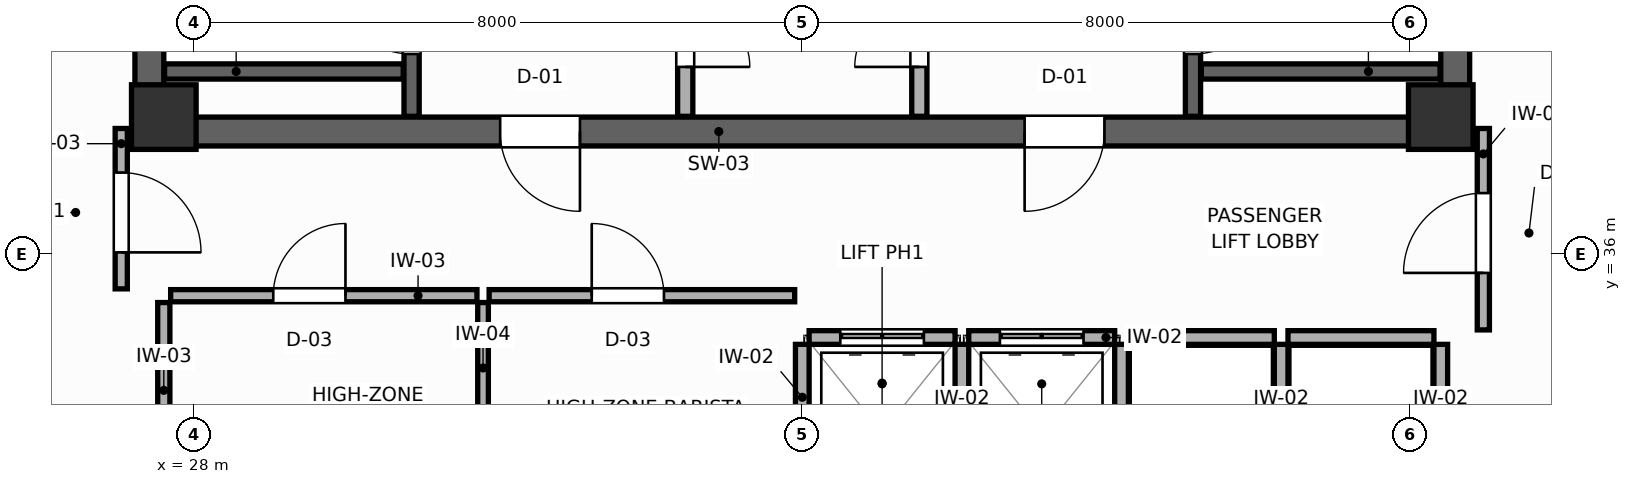
"""IFC4 building model, lengths in metres.
Left out: names, types, materials, properties, quantities, classifications, styles, units other than length and angle.
Written with IfcOpenShell. Run it as: python <this file> out.ifc"""

import sys

from ifc_helpers import new_model, si_unit, direction, frame, frame_2d, origin, origin_2d, place, context, subcontext, project, spatial, rectangle, extrude, source, transform, mapped, element, fill, save


model = new_model("IFC4")
c1 = context("Model", 3, precision=1e-05, world=origin(), true_north=direction((0.0, 1.0)))
c2 = subcontext(c1, "Body", "Model", "MODEL_VIEW")
j1 = project(units=[si_unit("LENGTHUNIT", "METRE"), si_unit("PLANEANGLEUNIT", "RADIAN")], contexts=[c1])
p1 = place(None, origin())
s1 = spatial("IfcSite", under=j1, at=p1, CompositionType="ELEMENT")
p2 = place(p1, origin())
s2 = spatial("IfcBuilding", under=s1, at=p2, CompositionType="ELEMENT")
p3 = place(p2, frame((0.0, 0.0, 264.6)))
s3 = spatial("IfcBuildingStorey", under=s2, at=p3, CompositionType="ELEMENT", Elevation=264.6)
p4 = place(p3, frame((27.22, 37.61, 0.0), z_axis=(0.0, 0.0, 1.0), x_axis=(1.0, 0.0, 0.0)))
e1 = element("IfcWall", 1, at=p4, inside=s3, PredefinedType="SHEAR", context=c2, shape_type="SweptSolid", body=[
    extrude(rectangle(XDim=17.56, YDim=0.38, at=frame_2d((8.78, 0.0))), origin(), (0.0, 0.0, 1.0), 3.6),
])
p5 = place(p4, frame((4.805, 0.0, 0.0)))
e2 = element("IfcOpeningElement", 2, at=p5, cuts=e1, PredefinedType="OPENING", context=c2, shape_type="SweptSolid", body=[
    extrude(rectangle(XDim=1.05, YDim=2.1, at=frame_2d((0.525, 1.05))), frame((0.0, 0.2, 0.0), z_axis=(0.0, -1.0, 0.0), x_axis=(1.0, 0.0, 0.0)), (0.0, 0.0, 1.0), 0.4),
])
p6 = place(p4, frame((11.705, 0.0, 0.0)))
e3 = element("IfcOpeningElement", 3, at=p6, cuts=e1, PredefinedType="OPENING", context=c2, shape_type="SweptSolid", body=[
    extrude(rectangle(XDim=1.05, YDim=2.1, at=frame_2d((0.525, 1.05))), frame((0.0, 0.2, 0.0), z_axis=(0.0, -1.0, 0.0), x_axis=(1.0, 0.0, 0.0)), (0.0, 0.0, 1.0), 0.4),
])
for number, where, z_axis, x_axis in (
    (4, (27.41, 37.8, 0.0), (0.0, 0.0, 1.0), (0.0, 1.0, 0.0)),
    (5, (44.59, 37.8, 0.0), (0.0, 0.0, 1.0), (0.0, 1.0, 0.0)),
):
    element("IfcWall", number, at=place(p3, frame(where, z_axis=z_axis, x_axis=x_axis)), inside=s3, PredefinedType="SHEAR", context=c2, shape_type="SweptSolid", body=[
        extrude(rectangle(XDim=9.0, YDim=0.38, at=frame_2d((4.5, 0.0))), origin(), (0.0, 0.0, 1.0), 3.6),
    ])
m1 = source(origin(), c2, "Body", "SweptSolid", [
    extrude(rectangle(XDim=0.85, YDim=0.85, at=origin_2d()), origin(), (0.0, 0.0, 1.0), 3.6),
])
for number, where, z_axis, x_axis in (
    (6, (27.6, 37.8, 0.0), (0.0, 0.0, 1.0), (1.0, 0.0, 0.0)),
    (7, (44.4, 37.8, 0.0), (0.0, 0.0, 1.0), (1.0, 0.0, 0.0)),
):
    element("IfcColumn", number, at=place(p3, frame(where, z_axis=z_axis, x_axis=x_axis)), inside=s3, PredefinedType="COLUMN", context=c2, shape_type="MappedRepresentation", body=[
        mapped(m1, transform((0.0, 0.0, 0.0), scale=1.0)),
    ])
p7 = place(p3, frame((30.86, 37.81, 0.0), z_axis=(0.0, 0.0, 1.0), x_axis=(0.0, 1.0, 0.0)))
e8 = element("IfcWall", 8, at=p7, inside=s3, PredefinedType="SHEAR", context=c2, shape_type="SweptSolid", body=[
    extrude(rectangle(XDim=8.98, YDim=0.2, at=frame_2d((4.49, 0.0))), origin(), (0.0, 0.0, 1.0), 3.6),
])
p8 = place(p7, frame((0.82, 0.0, 0.0)))
e9 = element("IfcOpeningElement", 9, at=p8, cuts=e8, PredefinedType="OPENING", context=c2, shape_type="SweptSolid", body=[
    extrude(rectangle(XDim=1.05, YDim=2.1, at=frame_2d((0.525, 1.05))), frame((0.0, 0.11, 0.0), z_axis=(0.0, -1.0, 0.0), x_axis=(1.0, 0.0, 0.0)), (0.0, 0.0, 1.0), 0.22),
])
p9 = place(p3, frame((27.61, 38.4, 0.0), z_axis=(0.0, 0.0, 1.0), x_axis=(1.0, 0.0, 0.0)))
e10 = element("IfcWall", 10, at=p9, inside=s3, PredefinedType="SHEAR", context=c2, shape_type="SweptSolid", body=[
    extrude(rectangle(XDim=3.14, YDim=0.2, at=frame_2d((1.57, 0.0))), origin(), (0.0, 0.0, 1.0), 3.6),
])
p10 = place(p3, frame((41.14, 37.81, 0.0), z_axis=(0.0, 0.0, 1.0), x_axis=(0.0, 1.0, 0.0)))
e11 = element("IfcWall", 11, at=p10, inside=s3, PredefinedType="SHEAR", context=c2, shape_type="SweptSolid", body=[
    extrude(rectangle(XDim=8.98, YDim=0.2, at=frame_2d((4.49, 0.0))), origin(), (0.0, 0.0, 1.0), 3.6),
])
p11 = place(p10, frame((0.82, 0.0, 0.0)))
e12 = element("IfcOpeningElement", 12, at=p11, cuts=e11, PredefinedType="OPENING", context=c2, shape_type="SweptSolid", body=[
    extrude(rectangle(XDim=1.05, YDim=2.1, at=frame_2d((0.525, 1.05))), frame((0.0, 0.11, 0.0), z_axis=(0.0, -1.0, 0.0), x_axis=(1.0, 0.0, 0.0)), (0.0, 0.0, 1.0), 0.22),
])
p12 = place(p3, frame((41.25, 38.4, 0.0), z_axis=(0.0, 0.0, 1.0), x_axis=(1.0, 0.0, 0.0)))
e13 = element("IfcWall", 13, at=p12, inside=s3, PredefinedType="SHEAR", context=c2, shape_type="SweptSolid", body=[
    extrude(rectangle(XDim=3.14, YDim=0.2, at=frame_2d((1.57, 0.0))), origin(), (0.0, 0.0, 1.0), 3.6),
])
p13 = place(p3, frame((34.46, 37.81, 0.0), z_axis=(0.0, 0.0, 1.0), x_axis=(0.0, 1.0, 0.0)))
e14 = element("IfcWall", 14, at=p13, inside=s3, PredefinedType="PARTITIONING", context=c2, shape_type="SweptSolid", body=[
    extrude(rectangle(XDim=8.98, YDim=0.2, at=frame_2d((4.49, 0.0))), origin(), (0.0, 0.0, 1.0), 3.41),
])
p14 = place(p13, frame((0.65, 0.0, 0.0)))
e15 = element("IfcOpeningElement", 15, at=p14, cuts=e14, PredefinedType="OPENING", context=c2, shape_type="SweptSolid", body=[
    extrude(rectangle(XDim=0.85, YDim=2.05, at=frame_2d((0.425, 1.025))), frame((0.0, 0.11, 0.0), z_axis=(0.0, -1.0, 0.0), x_axis=(1.0, 0.0, 0.0)), (0.0, 0.0, 1.0), 0.22),
])
p15 = place(p3, frame((37.54, 37.81, 0.0), z_axis=(0.0, 0.0, 1.0), x_axis=(0.0, 1.0, 0.0)))
e16 = element("IfcWall", 16, at=p15, inside=s3, PredefinedType="PARTITIONING", context=c2, shape_type="SweptSolid", body=[
    extrude(rectangle(XDim=8.98, YDim=0.2, at=frame_2d((4.49, 0.0))), origin(), (0.0, 0.0, 1.0), 3.41),
])
p16 = place(p15, frame((0.65, 0.0, 0.0)))
e17 = element("IfcOpeningElement", 17, at=p16, cuts=e16, PredefinedType="OPENING", context=c2, shape_type="SweptSolid", body=[
    extrude(rectangle(XDim=0.85, YDim=2.05, at=frame_2d((0.425, 1.025))), frame((0.0, 0.11, 0.0), z_axis=(0.0, -1.0, 0.0), x_axis=(1.0, 0.0, 0.0)), (0.0, 0.0, 1.0), 0.22),
])
p17 = place(p3, frame((36.09, 34.9, 0.0), z_axis=(0.0, 0.0, 1.0), x_axis=(1.0, 0.0, 0.0)))
e18 = element("IfcWall", 18, at=p17, inside=s3, PredefinedType="PARTITIONING", context=c2, shape_type="SweptSolid", body=[
    extrude(rectangle(XDim=1.92, YDim=0.18, at=frame_2d((0.96, 0.0))), origin(), (0.0, 0.0, 1.0), 3.41),
])
p18 = place(p17, frame((0.41, 0.0, 0.0)))
e19 = element("IfcOpeningElement", 19, at=p18, cuts=e18, PredefinedType="OPENING", context=c2, shape_type="SweptSolid", body=[
    extrude(rectangle(XDim=1.1, YDim=2.1, at=frame_2d((0.55, 1.05))), frame((0.0, 0.1, 0.0), z_axis=(0.0, -1.0, 0.0), x_axis=(1.0, 0.0, 0.0)), (0.0, 0.0, 1.0), 0.2),
])
p19 = place(p3, frame((36.0, 32.49, 0.0), z_axis=(0.0, 0.0, 1.0), x_axis=(0.0, 1.0, 0.0)))
e20 = element("IfcWall", 20, at=p19, inside=s3, PredefinedType="PARTITIONING", context=c2, shape_type="SweptSolid", body=[
    extrude(rectangle(XDim=2.32, YDim=0.18, at=frame_2d((1.16, 0.0))), origin(), (0.0, 0.0, 1.0), 3.41),
])
p20 = place(p3, frame((38.19, 34.9, 0.0), z_axis=(0.0, 0.0, 1.0), x_axis=(1.0, 0.0, 0.0)))
e21 = element("IfcWall", 21, at=p20, inside=s3, PredefinedType="PARTITIONING", context=c2, shape_type="SweptSolid", body=[
    extrude(rectangle(XDim=1.92, YDim=0.18, at=frame_2d((0.96, 0.0))), origin(), (0.0, 0.0, 1.0), 3.41),
])
p21 = place(p20, frame((0.41, 0.0, 0.0)))
e22 = element("IfcOpeningElement", 22, at=p21, cuts=e21, PredefinedType="OPENING", context=c2, shape_type="SweptSolid", body=[
    extrude(rectangle(XDim=1.1, YDim=2.1, at=frame_2d((0.55, 1.05))), frame((0.0, 0.1, 0.0), z_axis=(0.0, -1.0, 0.0), x_axis=(1.0, 0.0, 0.0)), (0.0, 0.0, 1.0), 0.2),
])
p22 = place(p3, frame((38.1, 32.49, 0.0), z_axis=(0.0, 0.0, 1.0), x_axis=(0.0, 1.0, 0.0)))
e23 = element("IfcWall", 23, at=p22, inside=s3, PredefinedType="PARTITIONING", context=c2, shape_type="SweptSolid", body=[
    extrude(rectangle(XDim=2.32, YDim=0.18, at=frame_2d((1.16, 0.0))), origin(), (0.0, 0.0, 1.0), 3.41),
])
p23 = place(p3, frame((40.29, 34.9, 0.0), z_axis=(0.0, 0.0, 1.0), x_axis=(1.0, 0.0, 0.0)))
e24 = element("IfcWall", 24, at=p23, inside=s3, PredefinedType="PARTITIONING", context=c2, shape_type="SweptSolid", body=[
    extrude(rectangle(XDim=1.92, YDim=0.18, at=frame_2d((0.96, 0.0))), origin(), (0.0, 0.0, 1.0), 3.41),
])
p24 = place(p3, frame((40.2, 32.49, 0.0), z_axis=(0.0, 0.0, 1.0), x_axis=(0.0, 1.0, 0.0)))
e25 = element("IfcWall", 25, at=p24, inside=s3, PredefinedType="PARTITIONING", context=c2, shape_type="SweptSolid", body=[
    extrude(rectangle(XDim=2.32, YDim=0.18, at=frame_2d((1.16, 0.0))), origin(), (0.0, 0.0, 1.0), 3.41),
])
p25 = place(p3, frame((42.39, 34.9, 0.0), z_axis=(0.0, 0.0, 1.0), x_axis=(1.0, 0.0, 0.0)))
e26 = element("IfcWall", 26, at=p25, inside=s3, PredefinedType="PARTITIONING", context=c2, shape_type="SweptSolid", body=[
    extrude(rectangle(XDim=1.92, YDim=0.18, at=frame_2d((0.96, 0.0))), origin(), (0.0, 0.0, 1.0), 3.41),
])
for number, where, z_axis, x_axis in (
    (27, (42.3, 32.49, 0.0), (0.0, 0.0, 1.0), (0.0, 1.0, 0.0)),
    (28, (44.4, 32.49, 0.0), (0.0, 0.0, 1.0), (0.0, 1.0, 0.0)),
):
    element("IfcWall", number, at=place(p3, frame(where, z_axis=z_axis, x_axis=x_axis)), inside=s3, PredefinedType="PARTITIONING", context=c2, shape_type="SweptSolid", body=[
        extrude(rectangle(XDim=2.32, YDim=0.18, at=frame_2d((1.16, 0.0))), origin(), (0.0, 0.0, 1.0), 3.41),
    ])
p26 = place(p3, frame((27.6, 33.05, 0.0), z_axis=(0.0, 0.0, 1.0), x_axis=(0.0, 1.0, 0.0)))
e29 = element("IfcWall", 29, at=p26, inside=s3, PredefinedType="PARTITIONING", context=c2, shape_type="SweptSolid", body=[
    extrude(rectangle(XDim=2.31, YDim=0.16, at=frame_2d((1.155, 0.0))), origin(), (0.0, 0.0, 1.0), 3.41),
])
p27 = place(p3, frame((31.8, 32.49, 0.0), z_axis=(0.0, 0.0, 1.0), x_axis=(0.0, 1.0, 0.0)))
e30 = element("IfcWall", 30, at=p27, inside=s3, PredefinedType="PARTITIONING", context=c2, shape_type="SweptSolid", body=[
    extrude(rectangle(XDim=2.87, YDim=0.14, at=frame_2d((1.435, 0.0))), origin(), (0.0, 0.0, 1.0), 3.41),
])
p28 = place(p3, frame((27.69, 35.45, 0.0), z_axis=(0.0, 0.0, 1.0), x_axis=(1.0, 0.0, 0.0)))
e31 = element("IfcWall", 31, at=p28, inside=s3, PredefinedType="PARTITIONING", context=c2, shape_type="SweptSolid", body=[
    extrude(rectangle(XDim=4.03, YDim=0.16, at=frame_2d((2.015, 0.0))), origin(), (0.0, 0.0, 1.0), 3.41),
])
p29 = place(p28, frame((1.35, 0.0, 0.0)))
e32 = element("IfcOpeningElement", 32, at=p29, cuts=e31, PredefinedType="OPENING", context=c2, shape_type="SweptSolid", body=[
    extrude(rectangle(XDim=0.95, YDim=2.05, at=frame_2d((0.475, 1.025))), frame((0.0, 0.09, 0.0), z_axis=(0.0, -1.0, 0.0), x_axis=(1.0, 0.0, 0.0)), (0.0, 0.0, 1.0), 0.18),
])
p30 = place(p3, frame((31.88, 35.45, 0.0), z_axis=(0.0, 0.0, 1.0), x_axis=(1.0, 0.0, 0.0)))
e33 = element("IfcWall", 33, at=p30, inside=s3, PredefinedType="PARTITIONING", context=c2, shape_type="SweptSolid", body=[
    extrude(rectangle(XDim=4.02, YDim=0.16, at=frame_2d((2.01, 0.0))), origin(), (0.0, 0.0, 1.0), 3.41),
])
p31 = place(p30, frame((1.35, 0.0, 0.0)))
e34 = element("IfcOpeningElement", 34, at=p31, cuts=e33, PredefinedType="OPENING", context=c2, shape_type="SweptSolid", body=[
    extrude(rectangle(XDim=0.95, YDim=2.05, at=frame_2d((0.475, 1.025))), frame((0.0, 0.09, 0.0), z_axis=(0.0, -1.0, 0.0), x_axis=(1.0, 0.0, 0.0)), (0.0, 0.0, 1.0), 0.18),
])
p32 = place(p3, frame((27.04, 35.54, 0.0), z_axis=(0.0, 0.0, 1.0), x_axis=(0.0, 1.0, 0.0)))
e35 = element("IfcWall", 35, at=p32, inside=s3, PredefinedType="PARTITIONING", context=c2, shape_type="SweptSolid", body=[
    extrude(rectangle(XDim=2.11, YDim=0.16, at=frame_2d((1.055, 0.0))), origin(), (0.0, 0.0, 1.0), 3.41),
])
p33 = place(p32, frame((0.48, 0.0, 0.0)))
e36 = element("IfcOpeningElement", 36, at=p33, cuts=e35, PredefinedType="OPENING", context=c2, shape_type="SweptSolid", body=[
    extrude(rectangle(XDim=1.05, YDim=2.1, at=frame_2d((0.525, 1.05))), frame((0.0, 0.09, 0.0), z_axis=(0.0, -1.0, 0.0), x_axis=(1.0, 0.0, 0.0)), (0.0, 0.0, 1.0), 0.18),
])
p34 = place(p3, frame((44.96, 35.0, 0.0), z_axis=(0.0, 0.0, 1.0), x_axis=(0.0, 1.0, 0.0)))
e37 = element("IfcWall", 37, at=p34, inside=s3, PredefinedType="PARTITIONING", context=c2, shape_type="SweptSolid", body=[
    extrude(rectangle(XDim=2.65, YDim=0.16, at=frame_2d((1.325, 0.0))), origin(), (0.0, 0.0, 1.0), 3.41),
])
p35 = place(p34, frame((0.75, 0.0, 0.0)))
e38 = element("IfcOpeningElement", 38, at=p35, cuts=e37, PredefinedType="OPENING", context=c2, shape_type="SweptSolid", body=[
    extrude(rectangle(XDim=1.05, YDim=2.1, at=frame_2d((0.525, 1.05))), frame((0.0, 0.09, 0.0), z_axis=(0.0, -1.0, 0.0), x_axis=(1.0, 0.0, 0.0)), (0.0, 0.0, 1.0), 0.18),
])
p36 = place(p8, origin())
e39 = element("IfcDoor", 39, at=p36, inside=s3, OperationType="SINGLE_SWING_RIGHT", PredefinedType="DOOR", context=c2, shape_type="SweptSolid", body=[
    extrude(rectangle(XDim=1.05, YDim=2.1, at=frame_2d((0.525, 1.05))), frame((0.0, 0.025, 0.0), z_axis=(0.0, -1.0, 0.0), x_axis=(1.0, 0.0, 0.0)), (0.0, 0.0, 1.0), 0.05),
])
fill(e9, e39)
p37 = place(p11, frame((1.05, 0.0, 0.0), z_axis=(0.0, 0.0, 1.0), x_axis=(-1.0, 0.0, 0.0)))
e40 = element("IfcDoor", 40, at=p37, inside=s3, OperationType="SINGLE_SWING_LEFT", PredefinedType="DOOR", context=c2, shape_type="SweptSolid", body=[
    extrude(rectangle(XDim=1.05, YDim=2.1, at=frame_2d((0.525, 1.05))), frame((0.0, 0.025, 0.0), z_axis=(0.0, -1.0, 0.0), x_axis=(1.0, 0.0, 0.0)), (0.0, 0.0, 1.0), 0.05),
])
fill(e12, e40)
p38 = place(p14, frame((0.85, 0.0, 0.0), z_axis=(0.0, 0.0, 1.0), x_axis=(-1.0, 0.0, 0.0)))
e41 = element("IfcDoor", 41, at=p38, inside=s3, OperationType="SINGLE_SWING_RIGHT", PredefinedType="DOOR", context=c2, shape_type="SweptSolid", body=[
    extrude(rectangle(XDim=0.85, YDim=2.05, at=frame_2d((0.425, 1.025))), frame((0.0, 0.025, 0.0), z_axis=(0.0, -1.0, 0.0), x_axis=(1.0, 0.0, 0.0)), (0.0, 0.0, 1.0), 0.05),
])
fill(e15, e41)
p39 = place(p16, origin())
e42 = element("IfcDoor", 42, at=p39, inside=s3, OperationType="SINGLE_SWING_LEFT", PredefinedType="DOOR", context=c2, shape_type="SweptSolid", body=[
    extrude(rectangle(XDim=0.85, YDim=2.05, at=frame_2d((0.425, 1.025))), frame((0.0, 0.025, 0.0), z_axis=(0.0, -1.0, 0.0), x_axis=(1.0, 0.0, 0.0)), (0.0, 0.0, 1.0), 0.05),
])
fill(e17, e42)
p40 = place(p18, origin())
e43 = element("IfcDoor", 43, at=p40, inside=s3, OperationType="DOUBLE_DOOR_SLIDING", PredefinedType="DOOR", context=c2, shape_type="SweptSolid", body=[
    extrude(rectangle(XDim=1.1, YDim=2.1, at=frame_2d((0.55, 1.05))), frame((0.0, 0.025, 0.0), z_axis=(0.0, -1.0, 0.0), x_axis=(1.0, 0.0, 0.0)), (0.0, 0.0, 1.0), 0.05),
])
fill(e19, e43)
p41 = place(p21, origin())
e44 = element("IfcDoor", 44, at=p41, inside=s3, OperationType="DOUBLE_DOOR_SLIDING", PredefinedType="DOOR", context=c2, shape_type="SweptSolid", body=[
    extrude(rectangle(XDim=1.1, YDim=2.1, at=frame_2d((0.55, 1.05))), frame((0.0, 0.025, 0.0), z_axis=(0.0, -1.0, 0.0), x_axis=(1.0, 0.0, 0.0)), (0.0, 0.0, 1.0), 0.05),
])
fill(e22, e44)
p42 = place(p29, origin())
e45 = element("IfcDoor", 45, at=p42, inside=s3, OperationType="SINGLE_SWING_RIGHT", PredefinedType="DOOR", context=c2, shape_type="SweptSolid", body=[
    extrude(rectangle(XDim=0.95, YDim=2.05, at=frame_2d((0.475, 1.025))), frame((0.0, 0.025, 0.0), z_axis=(0.0, -1.0, 0.0), x_axis=(1.0, 0.0, 0.0)), (0.0, 0.0, 1.0), 0.05),
])
fill(e32, e45)
p43 = place(p31, origin())
e46 = element("IfcDoor", 46, at=p43, inside=s3, OperationType="SINGLE_SWING_LEFT", PredefinedType="DOOR", context=c2, shape_type="SweptSolid", body=[
    extrude(rectangle(XDim=0.95, YDim=2.05, at=frame_2d((0.475, 1.025))), frame((0.0, 0.025, 0.0), z_axis=(0.0, -1.0, 0.0), x_axis=(1.0, 0.0, 0.0)), (0.0, 0.0, 1.0), 0.05),
])
fill(e34, e46)
p44 = place(p33, frame((1.05, 0.0, 0.0), z_axis=(0.0, 0.0, 1.0), x_axis=(-1.0, 0.0, 0.0)))
e47 = element("IfcDoor", 47, at=p44, inside=s3, OperationType="SINGLE_SWING_RIGHT", PredefinedType="DOOR", context=c2, shape_type="SweptSolid", body=[
    extrude(rectangle(XDim=1.05, YDim=2.1, at=frame_2d((0.525, 1.05))), frame((0.0, 0.025, 0.0), z_axis=(0.0, -1.0, 0.0), x_axis=(1.0, 0.0, 0.0)), (0.0, 0.0, 1.0), 0.05),
])
fill(e36, e47)
p45 = place(p35, origin())
e48 = element("IfcDoor", 48, at=p45, inside=s3, OperationType="SINGLE_SWING_LEFT", PredefinedType="DOOR", context=c2, shape_type="SweptSolid", body=[
    extrude(rectangle(XDim=1.05, YDim=2.1, at=frame_2d((0.525, 1.05))), frame((0.0, 0.025, 0.0), z_axis=(0.0, -1.0, 0.0), x_axis=(1.0, 0.0, 0.0)), (0.0, 0.0, 1.0), 0.05),
])
fill(e38, e48)
p46 = place(p5, frame((1.05, 0.0, 0.0), z_axis=(0.0, 0.0, 1.0), x_axis=(-1.0, 0.0, 0.0)))
e49 = element("IfcDoor", 49, at=p46, inside=s3, OperationType="SINGLE_SWING_LEFT", PredefinedType="DOOR", context=c2, shape_type="SweptSolid", body=[
    extrude(rectangle(XDim=1.05, YDim=2.1, at=frame_2d((0.525, 1.05))), frame((0.0, 0.025, 0.0), z_axis=(0.0, -1.0, 0.0), x_axis=(1.0, 0.0, 0.0)), (0.0, 0.0, 1.0), 0.05),
])
fill(e2, e49)
p47 = place(p6, frame((1.05, 0.0, 0.0), z_axis=(0.0, 0.0, 1.0), x_axis=(-1.0, 0.0, 0.0)))
e50 = element("IfcDoor", 50, at=p47, inside=s3, OperationType="SINGLE_SWING_RIGHT", PredefinedType="DOOR", context=c2, shape_type="SweptSolid", body=[
    extrude(rectangle(XDim=1.05, YDim=2.1, at=frame_2d((0.525, 1.05))), frame((0.0, 0.025, 0.0), z_axis=(0.0, -1.0, 0.0), x_axis=(1.0, 0.0, 0.0)), (0.0, 0.0, 1.0), 0.05),
])
fill(e3, e50)
save(model, sys.argv[1])
